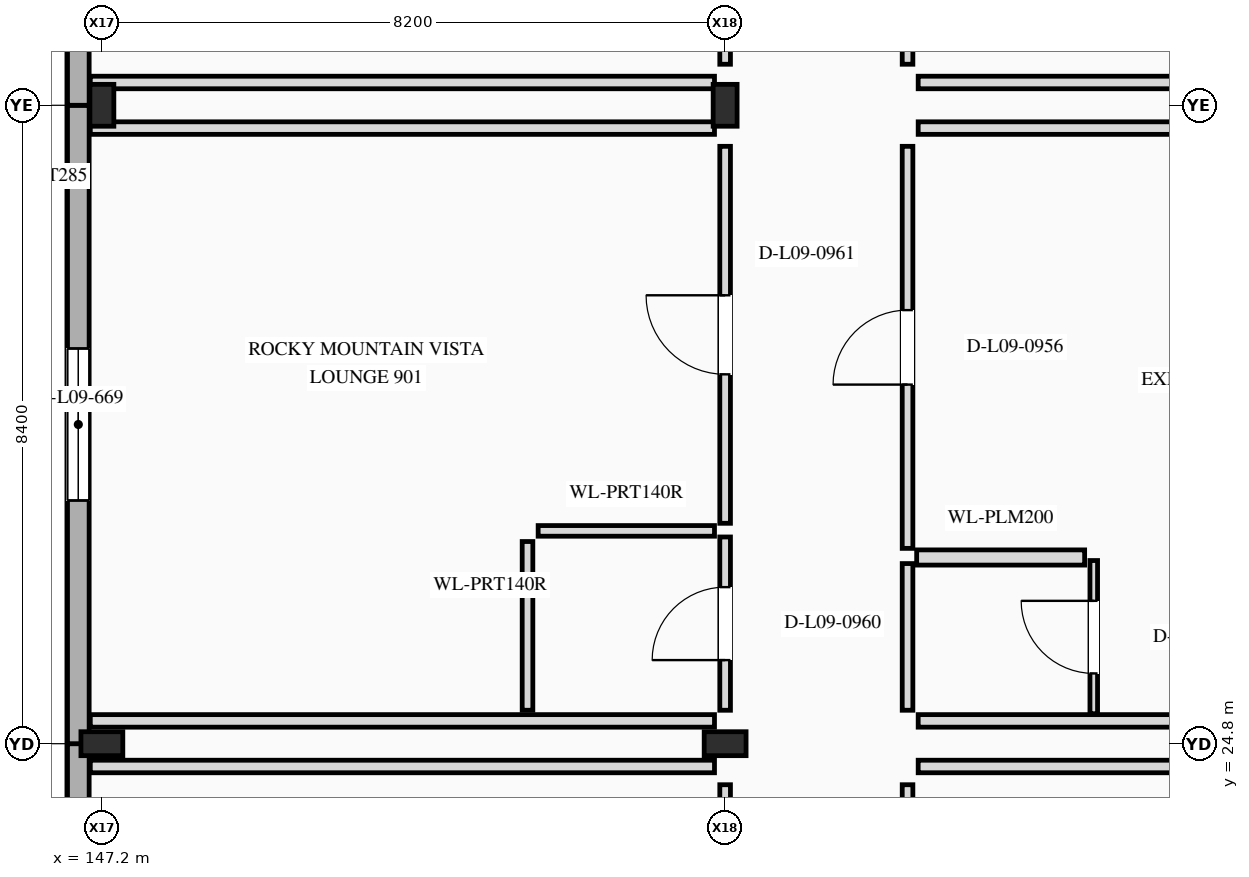
"""IFC4 building model, lengths in metres.
Left out: names, types, materials, properties, quantities, classifications, styles, units other than length and angle.
Written with IfcOpenShell. Run it as: python <this file> out.ifc"""

import sys

from ifc_helpers import new_model, si_unit, direction, frame, frame_2d, origin, origin_2d, place, context, subcontext, project, spatial, rectangle, i_section, extrude, element, fill, save


model = new_model("IFC4")
c1 = context("Model", 3, precision=1e-05, world=origin(), true_north=direction((0.0, 1.0)))
c2 = subcontext(c1, "Body", "Model", "MODEL_VIEW")
j1 = project(units=[si_unit("LENGTHUNIT", "METRE"), si_unit("PLANEANGLEUNIT", "RADIAN")], contexts=[c1])
p1 = place(None, origin())
s1 = spatial("IfcSite", under=j1, at=p1, CompositionType="ELEMENT")
p2 = place(p1, origin())
s2 = spatial("IfcBuilding", under=s1, at=p2, CompositionType="ELEMENT")
p3 = place(p2, frame((0.0, 0.0, 37.6)))
s3 = spatial("IfcBuildingStorey", under=s2, at=p3, CompositionType="ELEMENT", Elevation=37.6)
for number, where, z_axis, x_axis in (
    (1, (147.2, 24.8, 0.0), (0.0, 0.0, 1.0), (0.0, 1.0, 0.0)),
    (2, (147.2, 33.2, 0.0), (0.0, 0.0, 1.0), (1.0, 0.0, 0.0)),
    (3, (155.4, 24.8, 0.0), (0.0, 0.0, 1.0), (0.0, 1.0, 0.0)),
    (4, (155.4, 33.2, 0.0), (0.0, 0.0, 1.0), (1.0, 0.0, 0.0)),
):
    element("IfcColumn", number, at=place(p3, frame(where, z_axis=z_axis, x_axis=x_axis)), inside=s3, PredefinedType="COLUMN", context=c2, shape_type="SweptSolid", body=[
        extrude(i_section(OverallWidth=0.315, OverallDepth=0.551, WebThickness=0.015, FlangeThickness=0.024, at=origin_2d()), origin(), (0.0, 0.0, 1.0), 3.5),
    ])
p4 = place(p3, frame((146.89, 19.254, 0.0), z_axis=(0.0, 0.0, 1.0), x_axis=(0.0, 1.0, 0.0)))
e5 = element("IfcWall", 5, at=p4, inside=s3, PredefinedType="STANDARD", context=c2, shape_type="SweptSolid", body=[
    extrude(rectangle(XDim=5.546, YDim=0.285, at=frame_2d((2.773, 0.0))), origin(), (0.0, 0.0, 1.0), 3.5),
])
p5 = place(p4, frame((1.598, 0.0, 0.85)))
e6 = element("IfcOpeningElement", 6, at=p5, cuts=e5, PredefinedType="OPENING", context=c2, shape_type="SweptSolid", body=[
    extrude(rectangle(XDim=2.0, YDim=1.65, at=frame_2d((1.0, 0.825))), frame((0.0, 0.152, 0.0), z_axis=(0.0, -1.0, 0.0), x_axis=(1.0, 0.0, 0.0)), (0.0, 0.0, 1.0), 0.305),
])
p6 = place(p3, frame((146.89, 24.8, 0.0), z_axis=(0.0, 0.0, 1.0), x_axis=(0.0, 1.0, 0.0)))
e7 = element("IfcWall", 7, at=p6, inside=s3, PredefinedType="STANDARD", context=c2, shape_type="SweptSolid", body=[
    extrude(rectangle(XDim=8.4, YDim=0.285, at=frame_2d((4.2, 0.0))), origin(), (0.0, 0.0, 1.0), 3.5),
])
p7 = place(p6, frame((3.2, 0.0, 0.85)))
e8 = element("IfcOpeningElement", 8, at=p7, cuts=e7, PredefinedType="OPENING", context=c2, shape_type="SweptSolid", body=[
    extrude(rectangle(XDim=2.0, YDim=1.65, at=frame_2d((1.0, 0.825))), frame((0.0, 0.152, 0.0), z_axis=(0.0, -1.0, 0.0), x_axis=(1.0, 0.0, 0.0)), (0.0, 0.0, 1.0), 0.305),
])
p8 = place(p3, frame((146.89, 33.2, 0.0), z_axis=(0.0, 0.0, 1.0), x_axis=(0.0, 1.0, 0.0)))
e9 = element("IfcWall", 9, at=p8, inside=s3, PredefinedType="STANDARD", context=c2, shape_type="SweptSolid", body=[
    extrude(rectangle(XDim=8.4, YDim=0.285, at=frame_2d((4.2, 0.0))), origin(), (0.0, 0.0, 1.0), 3.5),
])
p9 = place(p3, frame((157.8, 21.37, 0.0), z_axis=(0.0, 0.0, 1.0), x_axis=(0.0, 1.0, 0.0)))
e10 = element("IfcWall", 10, at=p9, inside=s3, PredefinedType="PARTITIONING", context=c2, shape_type="SweptSolid", body=[
    extrude(rectangle(XDim=2.89, YDim=0.14, at=frame_2d((1.445, 0.0))), origin(), (0.0, 0.0, 1.0), 2.758),
])
p10 = place(p9, frame((0.985, 0.0, 0.0)))
e11 = element("IfcOpeningElement", 11, at=p10, cuts=e10, PredefinedType="OPENING", context=c2, shape_type="SweptSolid", body=[
    extrude(rectangle(XDim=0.92, YDim=2.15, at=frame_2d((0.46, 1.075))), frame((0.0, 0.08, 0.0), z_axis=(0.0, -1.0, 0.0), x_axis=(1.0, 0.0, 0.0)), (0.0, 0.0, 1.0), 0.16),
])
p11 = place(p3, frame((157.94, 24.5, 0.0), z_axis=(0.0, 0.0, 1.0), x_axis=(1.0, 0.0, 0.0)))
e12 = element("IfcWall", 12, at=p11, inside=s3, PredefinedType="PARTITIONING", context=c2, shape_type="SweptSolid", body=[
    extrude(rectangle(XDim=8.213, YDim=0.165, at=frame_2d((4.106, 0.0))), origin(), (0.0, 0.0, 1.0), 2.59),
])
p12 = place(p3, frame((155.4, 21.37, 0.0), z_axis=(0.0, 0.0, 1.0), x_axis=(0.0, 1.0, 0.0)))
e13 = element("IfcWall", 13, at=p12, inside=s3, PredefinedType="PARTITIONING", context=c2, shape_type="SweptSolid", body=[
    extrude(rectangle(XDim=2.89, YDim=0.14, at=frame_2d((1.445, 0.0))), origin(), (0.0, 0.0, 1.0), 2.674),
])
p13 = place(p12, frame((0.97, 0.0, 0.0)))
e14 = element("IfcOpeningElement", 14, at=p13, cuts=e13, PredefinedType="OPENING", context=c2, shape_type="SweptSolid", body=[
    extrude(rectangle(XDim=0.95, YDim=2.15, at=frame_2d((0.475, 1.075))), frame((0.0, 0.08, 0.0), z_axis=(0.0, -1.0, 0.0), x_axis=(1.0, 0.0, 0.0)), (0.0, 0.0, 1.0), 0.16),
])
p14 = place(p3, frame((147.048, 24.5, 0.0), z_axis=(0.0, 0.0, 1.0), x_axis=(1.0, 0.0, 0.0)))
e15 = element("IfcWall", 15, at=p14, inside=s3, PredefinedType="PARTITIONING", context=c2, shape_type="SweptSolid", body=[
    extrude(rectangle(XDim=8.212, YDim=0.165, at=frame_2d((4.106, 0.0))), origin(), (0.0, 0.0, 1.0), 2.613),
])
p15 = place(p3, frame((157.8, 25.24, 0.0), z_axis=(0.0, 0.0, 1.0), x_axis=(0.0, 1.0, 0.0)))
e16 = element("IfcWall", 16, at=p15, inside=s3, PredefinedType="PARTITIONING", context=c2, shape_type="SweptSolid", body=[
    extrude(rectangle(XDim=1.93, YDim=0.14, at=frame_2d((0.965, 0.0))), origin(), (0.0, 0.0, 1.0), 2.758),
])
p16 = place(p3, frame((157.8, 27.37, 0.0), z_axis=(0.0, 0.0, 1.0), x_axis=(0.0, 1.0, 0.0)))
e17 = element("IfcWall", 17, at=p16, inside=s3, PredefinedType="PARTITIONING", context=c2, shape_type="SweptSolid", body=[
    extrude(rectangle(XDim=5.29, YDim=0.14, at=frame_2d((2.645, 0.0))), origin(), (0.0, 0.0, 1.0), 2.758),
])
p17 = place(p16, frame((2.155, 0.0, 0.0)))
e18 = element("IfcOpeningElement", 18, at=p17, cuts=e17, PredefinedType="OPENING", context=c2, shape_type="SweptSolid", body=[
    extrude(rectangle(XDim=0.98, YDim=2.2, at=frame_2d((0.49, 1.1))), frame((0.0, 0.08, 0.0), z_axis=(0.0, -1.0, 0.0), x_axis=(1.0, 0.0, 0.0)), (0.0, 0.0, 1.0), 0.16),
])
for number, where, z_axis, x_axis in (
    (19, (157.94, 25.1, 0.0), (0.0, 0.0, 1.0), (1.0, 0.0, 0.0)),
    (20, (157.94, 32.9, 0.0), (0.0, 0.0, 1.0), (1.0, 0.0, 0.0)),
):
    element("IfcWall", number, at=place(p3, frame(where, z_axis=z_axis, x_axis=x_axis)), inside=s3, PredefinedType="PARTITIONING", context=c2, shape_type="SweptSolid", body=[
        extrude(rectangle(XDim=8.213, YDim=0.165, at=frame_2d((4.106, 0.0))), origin(), (0.0, 0.0, 1.0), 2.59),
    ])
p18 = place(p3, frame((157.92, 27.25, 0.0), z_axis=(0.0, 0.0, 1.0), x_axis=(1.0, 0.0, 0.0)))
e21 = element("IfcWall", 21, at=p18, inside=s3, PredefinedType="PLUMBINGWALL", context=c2, shape_type="SweptSolid", body=[
    extrude(rectangle(XDim=2.21, YDim=0.2, at=frame_2d((1.105, 0.0))), origin(), (0.0, 0.0, 1.0), 3.2),
])
p19 = place(p3, frame((160.25, 25.195, 0.0), z_axis=(0.0, 0.0, 1.0), x_axis=(0.0, 1.0, 0.0)))
e22 = element("IfcWall", 22, at=p19, inside=s3, PredefinedType="PARTITIONING", context=c2, shape_type="SweptSolid", body=[
    extrude(rectangle(XDim=2.015, YDim=0.1, at=frame_2d((1.008, 0.0))), origin(), (0.0, 0.0, 1.0), 2.758),
])
p20 = place(p19, frame((0.53, 0.0, 0.0)))
e23 = element("IfcOpeningElement", 23, at=p20, cuts=e22, PredefinedType="OPENING", context=c2, shape_type="SweptSolid", body=[
    extrude(rectangle(XDim=0.955, YDim=2.14, at=frame_2d((0.478, 1.07))), frame((0.0, 0.06, 0.0), z_axis=(0.0, -1.0, 0.0), x_axis=(1.0, 0.0, 0.0)), (0.0, 0.0, 1.0), 0.12),
])
p21 = place(p3, frame((155.4, 25.24, 0.0), z_axis=(0.0, 0.0, 1.0), x_axis=(0.0, 1.0, 0.0)))
e24 = element("IfcWall", 24, at=p21, inside=s3, PredefinedType="PARTITIONING", context=c2, shape_type="SweptSolid", body=[
    extrude(rectangle(XDim=2.28, YDim=0.14, at=frame_2d((1.14, 0.0))), origin(), (0.0, 0.0, 1.0), 2.674),
])
p22 = place(p21, frame((0.66, 0.0, 0.0)))
e25 = element("IfcOpeningElement", 25, at=p22, cuts=e24, PredefinedType="OPENING", context=c2, shape_type="SweptSolid", body=[
    extrude(rectangle(XDim=0.96, YDim=2.15, at=frame_2d((0.48, 1.075))), frame((0.0, 0.08, 0.0), z_axis=(0.0, -1.0, 0.0), x_axis=(1.0, 0.0, 0.0)), (0.0, 0.0, 1.0), 0.16),
])
p23 = place(p3, frame((152.8, 25.24, 0.0), z_axis=(0.0, 0.0, 1.0), x_axis=(0.0, 1.0, 0.0)))
e26 = element("IfcWall", 26, at=p23, inside=s3, PredefinedType="PARTITIONING", context=c2, shape_type="SweptSolid", body=[
    extrude(rectangle(XDim=2.22, YDim=0.14, at=frame_2d((1.11, 0.0))), origin(), (0.0, 0.0, 1.0), 2.808),
])
p24 = place(p3, frame((152.94, 27.6, 0.0), z_axis=(0.0, 0.0, 1.0), x_axis=(1.0, 0.0, 0.0)))
e27 = element("IfcWall", 27, at=p24, inside=s3, PredefinedType="PARTITIONING", context=c2, shape_type="SweptSolid", body=[
    extrude(rectangle(XDim=2.32, YDim=0.14, at=frame_2d((1.16, 0.0))), origin(), (0.0, 0.0, 1.0), 3.2),
])
p25 = place(p3, frame((155.4, 27.7, 0.0), z_axis=(0.0, 0.0, 1.0), x_axis=(0.0, 1.0, 0.0)))
e28 = element("IfcWall", 28, at=p25, inside=s3, PredefinedType="PARTITIONING", context=c2, shape_type="SweptSolid", body=[
    extrude(rectangle(XDim=4.96, YDim=0.14, at=frame_2d((2.48, 0.0))), origin(), (0.0, 0.0, 1.0), 2.674),
])
p26 = place(p25, frame((1.96, 0.0, 0.0)))
e29 = element("IfcOpeningElement", 29, at=p26, cuts=e28, PredefinedType="OPENING", context=c2, shape_type="SweptSolid", body=[
    extrude(rectangle(XDim=1.04, YDim=2.25, at=frame_2d((0.52, 1.125))), frame((0.0, 0.08, 0.0), z_axis=(0.0, -1.0, 0.0), x_axis=(1.0, 0.0, 0.0)), (0.0, 0.0, 1.0), 0.16),
])
for number, where, z_axis, x_axis in (
    (30, (147.048, 25.1, 0.0), (0.0, 0.0, 1.0), (1.0, 0.0, 0.0)),
    (31, (147.048, 32.9, 0.0), (0.0, 0.0, 1.0), (1.0, 0.0, 0.0)),
):
    element("IfcWall", number, at=place(p3, frame(where, z_axis=z_axis, x_axis=x_axis)), inside=s3, PredefinedType="PARTITIONING", context=c2, shape_type="SweptSolid", body=[
        extrude(rectangle(XDim=8.212, YDim=0.165, at=frame_2d((4.106, 0.0))), origin(), (0.0, 0.0, 1.0), 2.613),
    ])
p27 = place(p3, frame((157.8, 33.74, 0.0), z_axis=(0.0, 0.0, 1.0), x_axis=(0.0, 1.0, 0.0)))
e32 = element("IfcWall", 32, at=p27, inside=s3, PredefinedType="PARTITIONING", context=c2, shape_type="SweptSolid", body=[
    extrude(rectangle(XDim=7.32, YDim=0.14, at=frame_2d((3.66, 0.0))), origin(), (0.0, 0.0, 1.0), 2.753),
])
p28 = place(p27, frame((3.125, 0.0, 0.0)))
e33 = element("IfcOpeningElement", 33, at=p28, cuts=e32, PredefinedType="OPENING", context=c2, shape_type="SweptSolid", body=[
    extrude(rectangle(XDim=1.07, YDim=2.25, at=frame_2d((0.535, 1.125))), frame((0.0, 0.08, 0.0), z_axis=(0.0, -1.0, 0.0), x_axis=(1.0, 0.0, 0.0)), (0.0, 0.0, 1.0), 0.16),
])
p29 = place(p3, frame((157.94, 33.5, 0.0), z_axis=(0.0, 0.0, 1.0), x_axis=(1.0, 0.0, 0.0)))
e34 = element("IfcWall", 34, at=p29, inside=s3, PredefinedType="PARTITIONING", context=c2, shape_type="SweptSolid", body=[
    extrude(rectangle(XDim=8.213, YDim=0.165, at=frame_2d((4.106, 0.0))), origin(), (0.0, 0.0, 1.0), 2.59),
])
p30 = place(p3, frame((155.4, 33.74, 0.0), z_axis=(0.0, 0.0, 1.0), x_axis=(0.0, 1.0, 0.0)))
e35 = element("IfcWall", 35, at=p30, inside=s3, PredefinedType="PARTITIONING", context=c2, shape_type="SweptSolid", body=[
    extrude(rectangle(XDim=3.02, YDim=0.14, at=frame_2d((1.51, 0.0))), origin(), (0.0, 0.0, 1.0), 2.59),
])
p31 = place(p30, frame((1.05, 0.0, 0.0)))
e36 = element("IfcOpeningElement", 36, at=p31, cuts=e35, PredefinedType="OPENING", context=c2, shape_type="SweptSolid", body=[
    extrude(rectangle(XDim=0.92, YDim=2.3, at=frame_2d((0.46, 1.15))), frame((0.0, 0.08, 0.0), z_axis=(0.0, -1.0, 0.0), x_axis=(1.0, 0.0, 0.0)), (0.0, 0.0, 1.0), 0.16),
])
p32 = place(p3, frame((147.048, 33.5, 0.0), z_axis=(0.0, 0.0, 1.0), x_axis=(1.0, 0.0, 0.0)))
e37 = element("IfcWall", 37, at=p32, inside=s3, PredefinedType="PARTITIONING", context=c2, shape_type="SweptSolid", body=[
    extrude(rectangle(XDim=8.212, YDim=0.165, at=frame_2d((4.106, 0.0))), origin(), (0.0, 0.0, 1.0), 2.613),
])
p33 = place(p7, origin())
e38 = element("IfcWindow", 38, at=p33, inside=s3, PartitioningType="SINGLE_PANEL", PredefinedType="WINDOW", context=c2, shape_type="SweptSolid", body=[
    extrude(rectangle(XDim=2.0, YDim=1.65, at=frame_2d((1.0, 0.825))), frame((0.0, 0.03, 0.0), z_axis=(0.0, -1.0, 0.0), x_axis=(1.0, 0.0, 0.0)), (0.0, 0.0, 1.0), 0.06),
])
fill(e8, e38)
p34 = place(p17, origin())
e39 = element("IfcDoor", 39, at=p34, inside=s3, OperationType="SINGLE_SWING_LEFT", PredefinedType="DOOR", context=c2, shape_type="SweptSolid", body=[
    extrude(rectangle(XDim=0.98, YDim=2.2, at=frame_2d((0.49, 1.1))), frame((0.0, 0.025, 0.0), z_axis=(0.0, -1.0, 0.0), x_axis=(1.0, 0.0, 0.0)), (0.0, 0.0, 1.0), 0.05),
])
fill(e18, e39)
p35 = place(p20, origin())
e40 = element("IfcDoor", 40, at=p35, inside=s3, OperationType="SINGLE_SWING_RIGHT", PredefinedType="DOOR", context=c2, shape_type="SweptSolid", body=[
    extrude(rectangle(XDim=0.955, YDim=2.14, at=frame_2d((0.478, 1.07))), frame((0.0, 0.025, 0.0), z_axis=(0.0, -1.0, 0.0), x_axis=(1.0, 0.0, 0.0)), (0.0, 0.0, 1.0), 0.05),
])
fill(e23, e40)
p36 = place(p22, origin())
e41 = element("IfcDoor", 41, at=p36, inside=s3, OperationType="SINGLE_SWING_LEFT", PredefinedType="DOOR", context=c2, shape_type="SweptSolid", body=[
    extrude(rectangle(XDim=0.96, YDim=2.15, at=frame_2d((0.48, 1.075))), frame((0.0, 0.025, 0.0), z_axis=(0.0, -1.0, 0.0), x_axis=(1.0, 0.0, 0.0)), (0.0, 0.0, 1.0), 0.05),
])
fill(e25, e41)
p37 = place(p26, origin())
e42 = element("IfcDoor", 42, at=p37, inside=s3, OperationType="SINGLE_SWING_RIGHT", PredefinedType="DOOR", context=c2, shape_type="SweptSolid", body=[
    extrude(rectangle(XDim=1.04, YDim=2.25, at=frame_2d((0.52, 1.125))), frame((0.0, 0.025, 0.0), z_axis=(0.0, -1.0, 0.0), x_axis=(1.0, 0.0, 0.0)), (0.0, 0.0, 1.0), 0.05),
])
fill(e29, e42)
save(model, sys.argv[1])
